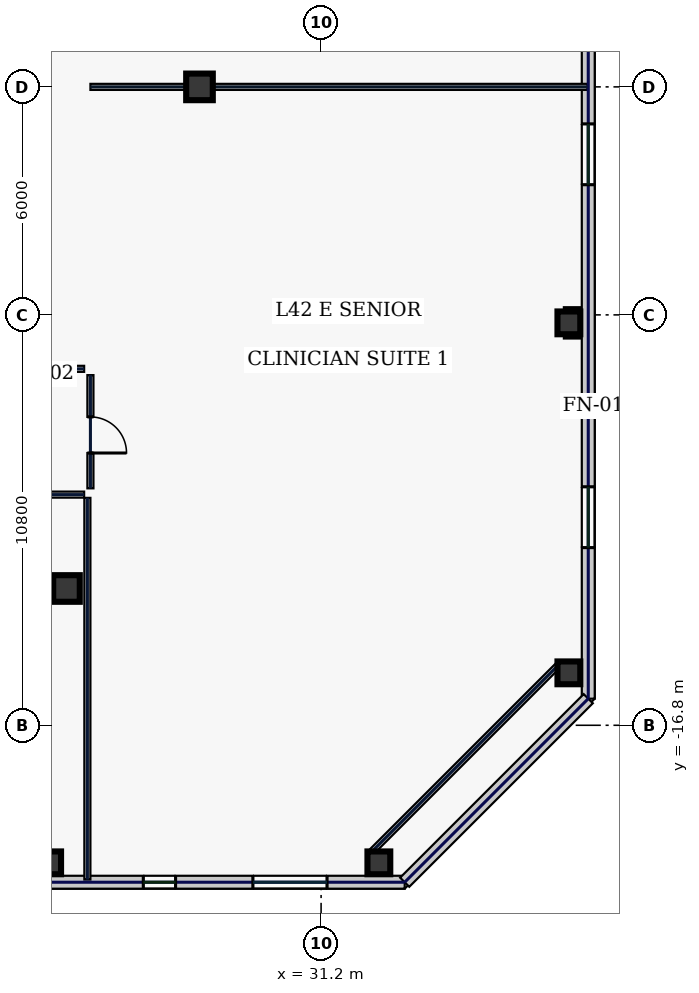
"""IFC4 building model, lengths in metres.
Left out: names, types, materials, properties, quantities, classifications, styles, units other than length and angle.
Written with IfcOpenShell. Run it as: python <this file> out.ifc"""

import sys

from ifc_helpers import new_model, si_unit, direction, frame, frame_2d, origin, origin_2d, place, context, subcontext, project, spatial, rectangle, hollow_rectangle, extrude, element, fill, save


model = new_model("IFC4")
c1 = context("Model", 3, precision=1e-05, world=origin(), true_north=direction((0.0, 1.0)))
c2 = subcontext(c1, "Body", "Model", "MODEL_VIEW")
j1 = project(units=[si_unit("LENGTHUNIT", "METRE"), si_unit("PLANEANGLEUNIT", "RADIAN")], contexts=[c1])
p1 = place(None, origin())
s1 = spatial("IfcSite", under=j1, at=p1, CompositionType="ELEMENT")
p2 = place(p1, origin())
s2 = spatial("IfcBuilding", under=s1, at=p2, CompositionType="ELEMENT")
p3 = place(p2, frame((0.0, 0.0, 184.2)))
s3 = spatial("IfcBuildingStorey", under=s2, at=p3, CompositionType="ELEMENT", Elevation=184.2)
for number, where, z_axis, x_axis in (
    (1, (24.5, -13.2, 0.0), (0.0, 0.0, 1.0), (1.0, 0.0, 0.0)),
    (2, (28.0, 0.0, 0.0), (0.0, 0.0, 1.0), (1.0, 0.0, 0.0)),
):
    element("IfcColumn", number, at=place(p3, frame(where, z_axis=z_axis, x_axis=x_axis)), inside=s3, PredefinedType="COLUMN", context=c2, shape_type="SweptSolid", body=[
        extrude(hollow_rectangle(XDim=0.7, YDim=0.7, WallThickness=0.032, at=origin_2d()), origin(), (0.0, 0.0, 1.0), 3.74),
    ])
for number, where, z_axis, x_axis in (
    (3, (24.057, -20.42, 0.0), (0.0, 0.0, 1.0), (1.0, 0.0, 0.0)),
    (4, (32.72, -20.42, 0.0), (0.0, 0.0, 1.0), (1.0, 0.0, 0.0)),
    (5, (37.72, -15.42, 0.0), (0.0, 0.0, 1.0), (1.0, 0.0, 0.0)),
    (6, (37.72, -6.21, 0.0), (0.0, 0.0, 1.0), (1.0, 0.0, 0.0)),
):
    element("IfcColumn", number, at=place(p3, frame(where, z_axis=z_axis, x_axis=x_axis)), inside=s3, PredefinedType="COLUMN", context=c2, shape_type="SweptSolid", body=[
        extrude(hollow_rectangle(XDim=0.6, YDim=0.6, WallThickness=0.028, at=origin_2d()), origin(), (0.0, 0.0, 1.0), 3.74),
    ])
p4 = place(p3, frame((13.463, -20.93, 0.0), z_axis=(0.0, 0.0, 1.0), x_axis=(1.0, 0.0, 0.0)))
e7 = element("IfcWall", 7, at=p4, inside=s3, PredefinedType="STANDARD", context=c2, shape_type="SweptSolid", body=[
    extrude(rectangle(XDim=19.937, YDim=0.34, at=frame_2d((9.969, 0.0))), origin(), (0.0, 0.0, 1.0), 3.74),
])
p5 = place(p4, frame((3.295, 0.0, 0.8)))
e8 = element("IfcOpeningElement", 8, at=p5, cuts=e7, PredefinedType="OPENING", context=c2, shape_type="SweptSolid", body=[
    extrude(rectangle(XDim=1.95, YDim=2.1, at=frame_2d((0.975, 1.05))), frame((0.0, 0.18, 0.0), z_axis=(0.0, -1.0, 0.0), x_axis=(1.0, 0.0, 0.0)), (0.0, 0.0, 1.0), 0.36),
])
p6 = place(p4, frame((8.38, 0.0, 0.8)))
e9 = element("IfcOpeningElement", 9, at=p6, cuts=e7, PredefinedType="OPENING", context=c2, shape_type="SweptSolid", body=[
    extrude(rectangle(XDim=0.85, YDim=1.85, at=frame_2d((0.425, 0.925))), frame((0.0, 0.18, 0.0), z_axis=(0.0, -1.0, 0.0), x_axis=(1.0, 0.0, 0.0)), (0.0, 0.0, 1.0), 0.36),
])
p7 = place(p4, frame((13.058, 0.0, 0.8)))
e10 = element("IfcOpeningElement", 10, at=p7, cuts=e7, PredefinedType="OPENING", context=c2, shape_type="SweptSolid", body=[
    extrude(rectangle(XDim=0.85, YDim=1.85, at=frame_2d((0.425, 0.925))), frame((0.0, 0.18, 0.0), z_axis=(0.0, -1.0, 0.0), x_axis=(1.0, 0.0, 0.0)), (0.0, 0.0, 1.0), 0.36),
])
p8 = place(p4, frame((15.943, 0.0, 0.8)))
e11 = element("IfcOpeningElement", 11, at=p8, cuts=e7, PredefinedType="OPENING", context=c2, shape_type="SweptSolid", body=[
    extrude(rectangle(XDim=1.95, YDim=2.1, at=frame_2d((0.975, 1.05))), frame((0.0, 0.18, 0.0), z_axis=(0.0, -1.0, 0.0), x_axis=(1.0, 0.0, 0.0)), (0.0, 0.0, 1.0), 0.36),
])
p9 = place(p3, frame((38.23, -16.1, 0.0), z_axis=(0.0, 0.0, 1.0), x_axis=(0.0, 1.0, 0.0)))
e12 = element("IfcWall", 12, at=p9, inside=s3, PredefinedType="STANDARD", context=c2, shape_type="SweptSolid", body=[
    extrude(rectangle(XDim=38.2, YDim=0.34, at=frame_2d((19.1, 0.0))), origin(), (0.0, 0.0, 1.0), 3.74),
])
p10 = place(p9, frame((3.975, 0.0, 0.58)))
e13 = element("IfcOpeningElement", 13, at=p10, cuts=e12, PredefinedType="OPENING", context=c2, shape_type="SweptSolid", body=[
    extrude(rectangle(XDim=1.6, YDim=2.3, at=frame_2d((0.8, 1.15))), frame((0.0, 0.18, 0.0), z_axis=(0.0, -1.0, 0.0), x_axis=(1.0, 0.0, 0.0)), (0.0, 0.0, 1.0), 0.36),
])
p11 = place(p9, frame((13.525, 0.0, 0.58)))
e14 = element("IfcOpeningElement", 14, at=p11, cuts=e12, PredefinedType="OPENING", context=c2, shape_type="SweptSolid", body=[
    extrude(rectangle(XDim=1.6, YDim=2.3, at=frame_2d((0.8, 1.15))), frame((0.0, 0.18, 0.0), z_axis=(0.0, -1.0, 0.0), x_axis=(1.0, 0.0, 0.0)), (0.0, 0.0, 1.0), 0.36),
])
p12 = place(p9, frame((23.075, 0.0, 0.58)))
e15 = element("IfcOpeningElement", 15, at=p12, cuts=e12, PredefinedType="OPENING", context=c2, shape_type="SweptSolid", body=[
    extrude(rectangle(XDim=1.6, YDim=2.3, at=frame_2d((0.8, 1.15))), frame((0.0, 0.18, 0.0), z_axis=(0.0, -1.0, 0.0), x_axis=(1.0, 0.0, 0.0)), (0.0, 0.0, 1.0), 0.36),
])
p13 = place(p9, frame((32.625, 0.0, 0.58)))
e16 = element("IfcOpeningElement", 16, at=p13, cuts=e12, PredefinedType="OPENING", context=c2, shape_type="SweptSolid", body=[
    extrude(rectangle(XDim=1.6, YDim=2.3, at=frame_2d((0.8, 1.15))), frame((0.0, 0.18, 0.0), z_axis=(0.0, -1.0, 0.0), x_axis=(1.0, 0.0, 0.0)), (0.0, 0.0, 1.0), 0.36),
])
p14 = place(p3, frame((33.4, -20.93, 0.0), z_axis=(0.0, 0.0, 1.0), x_axis=(0.707124652085, 0.707088909836, 0.0)))
e17 = element("IfcWall", 17, at=p14, inside=s3, PredefinedType="STANDARD", context=c2, shape_type="SweptSolid", body=[
    extrude(rectangle(XDim=6.831, YDim=0.34, at=frame_2d((3.415, 0.0))), origin(), (0.0, 0.0, 1.0), 3.74),
])
p15 = place(p3, frame((32.479, -20.18, 0.0), z_axis=(0.0, 0.0, 1.0), x_axis=(0.707106781187, 0.707106781187, 0.0)))
e18 = element("IfcWall", 18, at=p15, inside=s3, PredefinedType="PARTITIONING", context=c2, shape_type="SweptSolid", body=[
    extrude(rectangle(XDim=7.071, YDim=0.16, at=frame_2d((3.536, 0.0))), origin(), (0.0, 0.0, 1.0), 3.74),
])
p16 = place(p3, frame((10.715, -7.42, 0.0), z_axis=(0.0, 0.0, 1.0), x_axis=(1.0, 0.0, 0.0)))
e19 = element("IfcWall", 19, at=p16, inside=s3, PredefinedType="PARTITIONING", context=c2, shape_type="SweptSolid", body=[
    extrude(rectangle(XDim=14.25, YDim=0.16, at=frame_2d((7.125, 0.0))), origin(), (0.0, 0.0, 1.0), 3.74),
])
p17 = place(p3, frame((25.13, -7.585, 0.0), z_axis=(0.0, 0.0, 1.0), x_axis=(0.0, -1.0, 0.0)))
e20 = element("IfcWall", 20, at=p17, inside=s3, PredefinedType="PARTITIONING", context=c2, shape_type="SweptSolid", body=[
    extrude(rectangle(XDim=2.98, YDim=0.16, at=frame_2d((1.49, 0.0))), origin(), (0.0, 0.0, 1.0), 3.74),
])
p18 = place(p17, frame((1.1, 0.0, 0.0)))
e21 = element("IfcOpeningElement", 21, at=p18, cuts=e20, PredefinedType="OPENING", context=c2, shape_type="SweptSolid", body=[
    extrude(rectangle(XDim=0.95, YDim=2.2, at=frame_2d((0.475, 1.1))), frame((0.0, 0.09, 0.0), z_axis=(0.0, -1.0, 0.0), x_axis=(1.0, 0.0, 0.0)), (0.0, 0.0, 1.0), 0.18),
])
p19 = place(p3, frame((24.965, -10.73, 0.0), z_axis=(0.0, 0.0, 1.0), x_axis=(-1.0, 0.0, 0.0)))
e22 = element("IfcWall", 22, at=p19, inside=s3, PredefinedType="PARTITIONING", context=c2, shape_type="SweptSolid", body=[
    extrude(rectangle(XDim=49.93, YDim=0.16, at=frame_2d((24.965, 0.0))), origin(), (0.0, 0.0, 1.0), 3.74),
])
p20 = place(p19, frame((47.106, 0.0, 0.0)))
e23 = element("IfcOpeningElement", 23, at=p20, cuts=e22, PredefinedType="OPENING", context=c2, shape_type="SweptSolid", body=[
    extrude(rectangle(XDim=0.95, YDim=2.2, at=frame_2d((0.475, 1.1))), frame((0.0, 0.09, 0.0), z_axis=(0.0, -1.0, 0.0), x_axis=(1.0, 0.0, 0.0)), (0.0, 0.0, 1.0), 0.18),
])
p21 = place(p19, frame((40.475, 0.0, 0.0)))
e24 = element("IfcOpeningElement", 24, at=p21, cuts=e22, PredefinedType="OPENING", context=c2, shape_type="SweptSolid", body=[
    extrude(rectangle(XDim=1.15, YDim=2.2, at=frame_2d((0.575, 1.1))), frame((0.0, 0.09, 0.0), z_axis=(0.0, -1.0, 0.0), x_axis=(1.0, 0.0, 0.0)), (0.0, 0.0, 1.0), 0.18),
])
p22 = place(p19, frame((29.1, 0.0, 0.0)))
e25 = element("IfcOpeningElement", 25, at=p22, cuts=e22, PredefinedType="OPENING", context=c2, shape_type="SweptSolid", body=[
    extrude(rectangle(XDim=1.3, YDim=2.2, at=frame_2d((0.65, 1.1))), frame((0.0, 0.09, 0.0), z_axis=(0.0, -1.0, 0.0), x_axis=(1.0, 0.0, 0.0)), (0.0, 0.0, 1.0), 0.18),
])
p23 = place(p19, frame((15.84, 0.0, 0.0)))
e26 = element("IfcOpeningElement", 26, at=p23, cuts=e22, PredefinedType="OPENING", context=c2, shape_type="SweptSolid", body=[
    extrude(rectangle(XDim=1.3, YDim=2.2, at=frame_2d((0.65, 1.1))), frame((0.0, 0.09, 0.0), z_axis=(0.0, -1.0, 0.0), x_axis=(1.0, 0.0, 0.0)), (0.0, 0.0, 1.0), 0.18),
])
p24 = place(p19, frame((6.815, 0.0, 0.0)))
e27 = element("IfcOpeningElement", 27, at=p24, cuts=e22, PredefinedType="OPENING", context=c2, shape_type="SweptSolid", body=[
    extrude(rectangle(XDim=0.95, YDim=2.2, at=frame_2d((0.475, 1.1))), frame((0.0, 0.09, 0.0), z_axis=(0.0, -1.0, 0.0), x_axis=(1.0, 0.0, 0.0)), (0.0, 0.0, 1.0), 0.18),
])
p25 = place(p19, frame((2.044, 0.0, 0.0)))
e28 = element("IfcOpeningElement", 28, at=p25, cuts=e22, PredefinedType="OPENING", context=c2, shape_type="SweptSolid", body=[
    extrude(rectangle(XDim=0.95, YDim=2.2, at=frame_2d((0.475, 1.1))), frame((0.0, 0.09, 0.0), z_axis=(0.0, -1.0, 0.0), x_axis=(1.0, 0.0, 0.0)), (0.0, 0.0, 1.0), 0.18),
])
p26 = place(p3, frame((25.05, -20.86, 0.0), z_axis=(0.0, 0.0, 1.0), x_axis=(0.0, 1.0, 0.0)))
e29 = element("IfcWall", 29, at=p26, inside=s3, PredefinedType="PARTITIONING", context=c2, shape_type="SweptSolid", body=[
    extrude(rectangle(XDim=10.045, YDim=0.16, at=frame_2d((5.022, 0.0))), origin(), (0.0, 0.0, 1.0), 3.74),
])
p27 = place(p3, frame((25.13, 0.0, 0.0), z_axis=(0.0, 0.0, 1.0), x_axis=(1.0, 0.0, 0.0)))
e30 = element("IfcWall", 30, at=p27, inside=s3, PredefinedType="PARTITIONING", context=c2, shape_type="SweptSolid", body=[
    extrude(rectangle(XDim=13.08, YDim=0.16, at=frame_2d((6.54, 0.0))), origin(), (0.0, 0.0, 1.0), 3.285),
])
p28 = place(p7, origin())
e31 = element("IfcWindow", 31, at=p28, inside=s3, PartitioningType="SINGLE_PANEL", PredefinedType="WINDOW", context=c2, shape_type="SweptSolid", body=[
    extrude(rectangle(XDim=0.85, YDim=1.85, at=frame_2d((0.425, 0.925))), frame((0.0, 0.03, 0.0), z_axis=(0.0, -1.0, 0.0), x_axis=(1.0, 0.0, 0.0)), (0.0, 0.0, 1.0), 0.06),
])
fill(e10, e31)
p29 = place(p8, origin())
e32 = element("IfcWindow", 32, at=p29, inside=s3, PartitioningType="SINGLE_PANEL", PredefinedType="WINDOW", context=c2, shape_type="SweptSolid", body=[
    extrude(rectangle(XDim=1.95, YDim=2.1, at=frame_2d((0.975, 1.05))), frame((0.0, 0.03, 0.0), z_axis=(0.0, -1.0, 0.0), x_axis=(1.0, 0.0, 0.0)), (0.0, 0.0, 1.0), 0.06),
])
fill(e11, e32)
p30 = place(p10, origin())
e33 = element("IfcWindow", 33, at=p30, inside=s3, PartitioningType="SINGLE_PANEL", PredefinedType="WINDOW", context=c2, shape_type="SweptSolid", body=[
    extrude(rectangle(XDim=1.6, YDim=2.3, at=frame_2d((0.8, 1.15))), frame((0.0, 0.03, 0.0), z_axis=(0.0, -1.0, 0.0), x_axis=(1.0, 0.0, 0.0)), (0.0, 0.0, 1.0), 0.06),
])
fill(e13, e33)
p31 = place(p11, origin())
e34 = element("IfcWindow", 34, at=p31, inside=s3, PartitioningType="SINGLE_PANEL", PredefinedType="WINDOW", context=c2, shape_type="SweptSolid", body=[
    extrude(rectangle(XDim=1.6, YDim=2.3, at=frame_2d((0.8, 1.15))), frame((0.0, 0.03, 0.0), z_axis=(0.0, -1.0, 0.0), x_axis=(1.0, 0.0, 0.0)), (0.0, 0.0, 1.0), 0.06),
])
fill(e14, e34)
p32 = place(p18, origin())
e35 = element("IfcDoor", 35, at=p32, inside=s3, OperationType="SINGLE_SWING_RIGHT", PredefinedType="DOOR", context=c2, shape_type="SweptSolid", body=[
    extrude(rectangle(XDim=0.95, YDim=2.2, at=frame_2d((0.475, 1.1))), frame((0.0, 0.025, 0.0), z_axis=(0.0, -1.0, 0.0), x_axis=(1.0, 0.0, 0.0)), (0.0, 0.0, 1.0), 0.05),
])
fill(e21, e35)
save(model, sys.argv[1])
